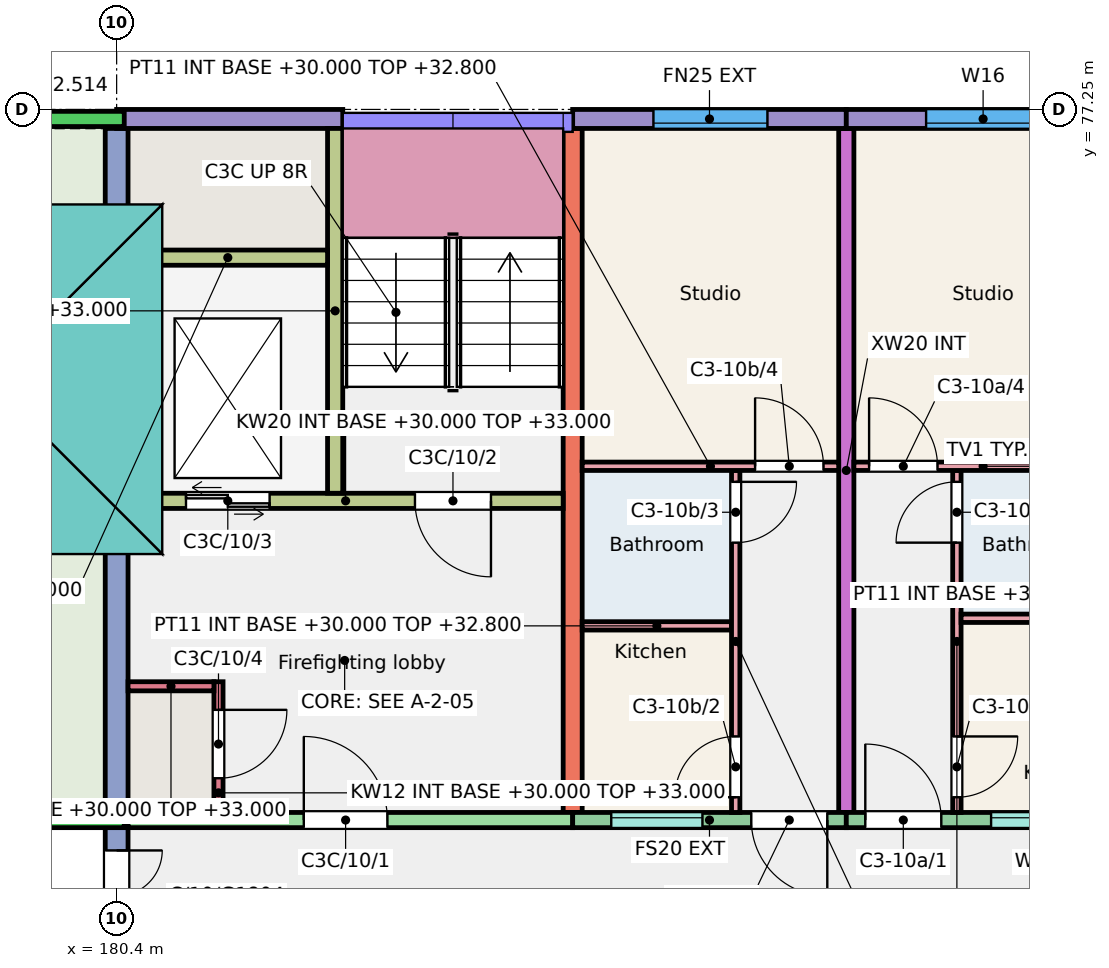
"""IFC4 building model, lengths in metres.
Left out: names, types, materials, properties, quantities, classifications, styles, units other than length and angle.
Written with IfcOpenShell. Run it as: python <this file> out.ifc"""

import sys

from ifc_helpers import new_model, si_unit, direction, frame, frame_2d, origin, place, context, subcontext, project, spatial, rectangle, extrude, element, fill, save


model = new_model("IFC4")
c1 = context("Model", 3, precision=1e-05, world=origin(), true_north=direction((0.0, 1.0)))
c2 = subcontext(c1, "Body", "Model", "MODEL_VIEW")
j1 = project(units=[si_unit("LENGTHUNIT", "METRE"), si_unit("PLANEANGLEUNIT", "RADIAN")], contexts=[c1])
p1 = place(None, origin())
s1 = spatial("IfcSite", under=j1, at=p1, CompositionType="ELEMENT")
p2 = place(p1, origin())
s2 = spatial("IfcBuilding", under=s1, at=p2, CompositionType="ELEMENT")
p3 = place(p2, frame((0.0, 0.0, 30.0)))
s3 = spatial("IfcBuildingStorey", under=s2, at=p3, CompositionType="ELEMENT", Elevation=30.0)
p4 = place(p3, frame((180.4, 66.0, 0.0), z_axis=(0.0, 0.0, 1.0), x_axis=(0.0, 1.0, 0.0)))
e1 = element("IfcWall", 1, at=p4, inside=s3, PredefinedType="SHEAR", context=c2, shape_type="SweptSolid", body=[
    extrude(rectangle(XDim=11.0, YDim=0.3, at=frame_2d((5.5, 0.0))), origin(), (0.0, 0.0, 1.0), 3.0),
])
p5 = place(p4, frame((0.3, 0.0, 0.0)))
e2 = element("IfcOpeningElement", 2, at=p5, cuts=e1, PredefinedType="OPENING", context=c2, shape_type="SweptSolid", body=[
    extrude(rectangle(XDim=1.2, YDim=2.1, at=frame_2d((0.6, 1.05))), frame((0.0, 0.16, 0.0), z_axis=(0.0, -1.0, 0.0), x_axis=(1.0, 0.0, 0.0)), (0.0, 0.0, 1.0), 0.32),
])
p6 = place(p3, frame((186.4, 68.0, 0.0), z_axis=(0.0, 0.0, 1.0), x_axis=(0.0, 1.0, 0.0)))
e3 = element("IfcWall", 3, at=p6, inside=s3, PredefinedType="SHEAR", context=c2, shape_type="SweptSolid", body=[
    extrude(rectangle(XDim=9.0, YDim=0.25, at=frame_2d((4.5, 0.0))), origin(), (0.0, 0.0, 1.0), 3.0),
])
p7 = place(p3, frame((190.0, 68.0, 0.0), z_axis=(0.0, 0.0, 1.0), x_axis=(0.0, 1.0, 0.0)))
e4 = element("IfcWall", 4, at=p7, inside=s3, PredefinedType="SHEAR", context=c2, shape_type="SweptSolid", body=[
    extrude(rectangle(XDim=9.0, YDim=0.2, at=frame_2d((4.5, 0.0))), origin(), (0.0, 0.0, 1.0), 3.0),
])
p8 = place(p3, frame((180.4, 77.125, 0.0), z_axis=(0.0, 0.0, 1.0), x_axis=(1.0, 0.0, 0.0)))
e5 = element("IfcWall", 5, at=p8, inside=s3, PredefinedType="SOLIDWALL", context=c2, shape_type="SweptSolid", body=[
    extrude(rectangle(XDim=2.975, YDim=0.25, at=frame_2d((1.488, 0.0))), origin(), (0.0, 0.0, 1.0), 3.0),
])
p9 = place(p3, frame((180.55, 67.9, 0.0), z_axis=(0.0, 0.0, 1.0), x_axis=(1.0, 0.0, 0.0)))
e6 = element("IfcWall", 6, at=p9, inside=s3, PredefinedType="SHEAR", context=c2, shape_type="SweptSolid", body=[
    extrude(rectangle(XDim=5.85, YDim=0.2, at=frame_2d((2.925, 0.0))), origin(), (0.0, 0.0, 1.0), 3.0),
])
p10 = place(p9, frame((2.312, 0.0, 0.0)))
e7 = element("IfcOpeningElement", 7, at=p10, cuts=e6, PredefinedType="OPENING", context=c2, shape_type="SweptSolid", body=[
    extrude(rectangle(XDim=1.1, YDim=2.1, at=frame_2d((0.55, 1.05))), frame((0.0, 0.11, 0.0), z_axis=(0.0, -1.0, 0.0), x_axis=(1.0, 0.0, 0.0)), (0.0, 0.0, 1.0), 0.22),
])
p11 = place(p3, frame((180.55, 72.1, 0.0), z_axis=(0.0, 0.0, 1.0), x_axis=(1.0, 0.0, 0.0)))
e8 = element("IfcWall", 8, at=p11, inside=s3, PredefinedType="SHEAR", context=c2, shape_type="SweptSolid", body=[
    extrude(rectangle(XDim=5.725, YDim=0.2, at=frame_2d((2.862, 0.0))), origin(), (0.0, 0.0, 1.0), 3.0),
])
p12 = place(p11, frame((3.775, 0.0, 0.0)))
e9 = element("IfcOpeningElement", 9, at=p12, cuts=e8, PredefinedType="OPENING", context=c2, shape_type="SweptSolid", body=[
    extrude(rectangle(XDim=1.0, YDim=2.1, at=frame_2d((0.5, 1.05))), frame((0.0, 0.11, 0.0), z_axis=(0.0, -1.0, 0.0), x_axis=(1.0, 0.0, 0.0)), (0.0, 0.0, 1.0), 0.22),
])
p13 = place(p11, frame((0.762, 0.0, 0.0)))
e10 = element("IfcOpeningElement", 10, at=p13, cuts=e8, PredefinedType="OPENING", context=c2, shape_type="SweptSolid", body=[
    extrude(rectangle(XDim=1.1, YDim=2.1, at=frame_2d((0.55, 1.05))), frame((0.0, 0.11, 0.0), z_axis=(0.0, -1.0, 0.0), x_axis=(1.0, 0.0, 0.0)), (0.0, 0.0, 1.0), 0.22),
])
p14 = place(p3, frame((183.275, 72.2, 0.0), z_axis=(0.0, 0.0, 1.0), x_axis=(0.0, 1.0, 0.0)))
e11 = element("IfcWall", 11, at=p14, inside=s3, PredefinedType="SHEAR", context=c2, shape_type="SweptSolid", body=[
    extrude(rectangle(XDim=4.8, YDim=0.2, at=frame_2d((2.4, 0.0))), origin(), (0.0, 0.0, 1.0), 3.0),
])
p15 = place(p3, frame((180.55, 75.3, 0.0), z_axis=(0.0, 0.0, 1.0), x_axis=(1.0, 0.0, 0.0)))
e12 = element("IfcWall", 12, at=p15, inside=s3, PredefinedType="SHEAR", context=c2, shape_type="SweptSolid", body=[
    extrude(rectangle(XDim=2.625, YDim=0.2, at=frame_2d((1.312, 0.0))), origin(), (0.0, 0.0, 1.0), 3.0),
])
p16 = place(p3, frame((181.74, 68.0, 0.0), z_axis=(0.0, 0.0, 1.0), x_axis=(0.0, 1.0, 0.0)))
e13 = element("IfcWall", 13, at=p16, inside=s3, PredefinedType="SHEAR", context=c2, shape_type="SweptSolid", body=[
    extrude(rectangle(XDim=1.72, YDim=0.12, at=frame_2d((0.86, 0.0))), origin(), (0.0, 0.0, 1.0), 3.0),
])
p17 = place(p16, frame((0.45, 0.0, 0.0)))
e14 = element("IfcOpeningElement", 14, at=p17, cuts=e13, PredefinedType="OPENING", context=c2, shape_type="SweptSolid", body=[
    extrude(rectangle(XDim=0.9, YDim=2.1, at=frame_2d((0.45, 1.05))), frame((0.0, 0.07, 0.0), z_axis=(0.0, -1.0, 0.0), x_axis=(1.0, 0.0, 0.0)), (0.0, 0.0, 1.0), 0.14),
])
p18 = place(p3, frame((180.55, 69.66, 0.0), z_axis=(0.0, 0.0, 1.0), x_axis=(1.0, 0.0, 0.0)))
e15 = element("IfcWall", 15, at=p18, inside=s3, PredefinedType="SHEAR", context=c2, shape_type="SweptSolid", body=[
    extrude(rectangle(XDim=1.13, YDim=0.12, at=frame_2d((0.565, 0.0))), origin(), (0.0, 0.0, 1.0), 3.0),
])
p19 = place(p3, frame((186.4, 77.125, 0.0), z_axis=(0.0, 0.0, 1.0), x_axis=(1.0, 0.0, 0.0)))
e16 = element("IfcWall", 16, at=p19, inside=s3, PredefinedType="SOLIDWALL", context=c2, shape_type="SweptSolid", body=[
    extrude(rectangle(XDim=3.6, YDim=0.25, at=frame_2d((1.8, 0.0))), origin(), (0.0, 0.0, 1.0), 3.0),
])
p20 = place(p19, frame((1.062, 0.0, 0.9)))
e17 = element("IfcOpeningElement", 17, at=p20, cuts=e16, PredefinedType="OPENING", context=c2, shape_type="SweptSolid", body=[
    extrude(rectangle(XDim=1.5, YDim=1.5, at=frame_2d((0.75, 0.75))), frame((0.0, 0.135, 0.0), z_axis=(0.0, -1.0, 0.0), x_axis=(1.0, 0.0, 0.0)), (0.0, 0.0, 1.0), 0.27),
])
p21 = place(p3, frame((186.4, 67.9, 0.0), z_axis=(0.0, 0.0, 1.0), x_axis=(1.0, 0.0, 0.0)))
e18 = element("IfcWall", 18, at=p21, inside=s3, PredefinedType="SOLIDWALL", context=c2, shape_type="SweptSolid", body=[
    extrude(rectangle(XDim=3.6, YDim=0.2, at=frame_2d((1.8, 0.0))), origin(), (0.0, 0.0, 1.0), 3.0),
])
p22 = place(p21, frame((0.508, 0.0, 1.1)))
e19 = element("IfcOpeningElement", 19, at=p22, cuts=e18, PredefinedType="OPENING", context=c2, shape_type="SweptSolid", body=[
    extrude(rectangle(XDim=1.2, YDim=1.3, at=frame_2d((0.6, 0.65))), frame((0.0, 0.11, 0.0), z_axis=(0.0, -1.0, 0.0), x_axis=(1.0, 0.0, 0.0)), (0.0, 0.0, 1.0), 0.22),
])
p23 = place(p21, frame((2.35, 0.0, 0.0)))
e20 = element("IfcOpeningElement", 20, at=p23, cuts=e18, PredefinedType="OPENING", context=c2, shape_type="SweptSolid", body=[
    extrude(rectangle(XDim=1.0, YDim=2.1, at=frame_2d((0.5, 1.05))), frame((0.0, 0.11, 0.0), z_axis=(0.0, -1.0, 0.0), x_axis=(1.0, 0.0, 0.0)), (0.0, 0.0, 1.0), 0.22),
])
p24 = place(p3, frame((190.0, 77.125, 0.0), z_axis=(0.0, 0.0, 1.0), x_axis=(1.0, 0.0, 0.0)))
e21 = element("IfcWall", 21, at=p24, inside=s3, PredefinedType="SOLIDWALL", context=c2, shape_type="SweptSolid", body=[
    extrude(rectangle(XDim=3.6, YDim=0.25, at=frame_2d((1.8, 0.0))), origin(), (0.0, 0.0, 1.0), 3.0),
])
p25 = place(p24, frame((1.05, 0.0, 0.9)))
e22 = element("IfcOpeningElement", 22, at=p25, cuts=e21, PredefinedType="OPENING", context=c2, shape_type="SweptSolid", body=[
    extrude(rectangle(XDim=1.5, YDim=1.5, at=frame_2d((0.75, 0.75))), frame((0.0, 0.135, 0.0), z_axis=(0.0, -1.0, 0.0), x_axis=(1.0, 0.0, 0.0)), (0.0, 0.0, 1.0), 0.27),
])
p26 = place(p3, frame((190.0, 67.9, 0.0), z_axis=(0.0, 0.0, 1.0), x_axis=(1.0, 0.0, 0.0)))
e23 = element("IfcWall", 23, at=p26, inside=s3, PredefinedType="SOLIDWALL", context=c2, shape_type="SweptSolid", body=[
    extrude(rectangle(XDim=3.6, YDim=0.2, at=frame_2d((1.8, 0.0))), origin(), (0.0, 0.0, 1.0), 3.0),
])
p27 = place(p26, frame((1.905, 0.0, 1.1)))
e24 = element("IfcOpeningElement", 24, at=p27, cuts=e23, PredefinedType="OPENING", context=c2, shape_type="SweptSolid", body=[
    extrude(rectangle(XDim=1.2, YDim=1.3, at=frame_2d((0.6, 0.65))), frame((0.0, 0.11, 0.0), z_axis=(0.0, -1.0, 0.0), x_axis=(1.0, 0.0, 0.0)), (0.0, 0.0, 1.0), 0.22),
])
p28 = place(p26, frame((0.25, 0.0, 0.0)))
e25 = element("IfcOpeningElement", 25, at=p28, cuts=e23, PredefinedType="OPENING", context=c2, shape_type="SweptSolid", body=[
    extrude(rectangle(XDim=1.0, YDim=2.1, at=frame_2d((0.5, 1.05))), frame((0.0, 0.11, 0.0), z_axis=(0.0, -1.0, 0.0), x_axis=(1.0, 0.0, 0.0)), (0.0, 0.0, 1.0), 0.22),
])
for number, where, z_axis, x_axis in (
    (26, (177.425, 72.1, 0.0), (0.0, 0.0, 1.0), (1.0, 0.0, 0.0)),
    (27, (177.425, 75.3, 0.0), (0.0, 0.0, 1.0), (1.0, 0.0, 0.0)),
):
    element("IfcWall", number, at=place(p3, frame(where, z_axis=z_axis, x_axis=x_axis)), inside=s3, PredefinedType="SHEAR", context=c2, shape_type="SweptSolid", body=[
        extrude(rectangle(XDim=2.825, YDim=0.2, at=frame_2d((1.413, 0.0))), origin(), (0.0, 0.0, 1.0), 1.5),
    ])
for number, where, z_axis, x_axis in (
    (28, (174.3, 77.125, 0.0), (0.0, 0.0, 1.0), (1.0, 0.0, 0.0)),
    (29, (174.3, 67.9, 0.0), (0.0, 0.0, 1.0), (1.0, 0.0, 0.0)),
):
    element("IfcWall", number, at=place(p3, frame(where, z_axis=z_axis, x_axis=x_axis)), inside=s3, PredefinedType="PARAPET", context=c2, shape_type="SweptSolid", body=[
        extrude(rectangle(XDim=6.2, YDim=0.2, at=frame_2d((3.1, 0.0))), origin(), (0.0, 0.0, 1.0), 1.1),
    ])
p29 = place(p3, frame((191.455, 68.0, 0.0), z_axis=(0.0, 0.0, 1.0), x_axis=(0.0, 1.0, 0.0)))
e30 = element("IfcWall", 30, at=p29, inside=s3, PredefinedType="PARTITIONING", context=c2, shape_type="SweptSolid", body=[
    extrude(rectangle(XDim=4.5, YDim=0.11, at=frame_2d((2.25, 0.0))), origin(), (0.0, 0.0, 1.0), 2.75),
])
p30 = place(p29, frame((0.2, 0.0, 0.0)))
e31 = element("IfcOpeningElement", 31, at=p30, cuts=e30, PredefinedType="OPENING", context=c2, shape_type="SweptSolid", body=[
    extrude(rectangle(XDim=0.8, YDim=2.1, at=frame_2d((0.4, 1.05))), frame((0.0, 0.065, 0.0), z_axis=(0.0, -1.0, 0.0), x_axis=(1.0, 0.0, 0.0)), (0.0, 0.0, 1.0), 0.13),
])
p31 = place(p29, frame((3.55, 0.0, 0.0)))
e32 = element("IfcOpeningElement", 32, at=p31, cuts=e30, PredefinedType="OPENING", context=c2, shape_type="SweptSolid", body=[
    extrude(rectangle(XDim=0.8, YDim=2.1, at=frame_2d((0.4, 1.05))), frame((0.0, 0.065, 0.0), z_axis=(0.0, -1.0, 0.0), x_axis=(1.0, 0.0, 0.0)), (0.0, 0.0, 1.0), 0.13),
])
p32 = place(p3, frame((191.51, 70.555, 0.0), z_axis=(0.0, 0.0, 1.0), x_axis=(1.0, 0.0, 0.0)))
e33 = element("IfcWall", 33, at=p32, inside=s3, PredefinedType="PARTITIONING", context=c2, shape_type="SweptSolid", body=[
    extrude(rectangle(XDim=1.99, YDim=0.11, at=frame_2d((0.995, 0.0))), origin(), (0.0, 0.0, 1.0), 2.75),
])
p33 = place(p3, frame((190.1, 72.555, 0.0), z_axis=(0.0, 0.0, 1.0), x_axis=(1.0, 0.0, 0.0)))
e34 = element("IfcWall", 34, at=p33, inside=s3, PredefinedType="PARTITIONING", context=c2, shape_type="SweptSolid", body=[
    extrude(rectangle(XDim=3.4, YDim=0.11, at=frame_2d((1.7, 0.0))), origin(), (0.0, 0.0, 1.0), 2.75),
])
p34 = place(p33, frame((0.2, 0.0, 0.0)))
e35 = element("IfcOpeningElement", 35, at=p34, cuts=e34, PredefinedType="OPENING", context=c2, shape_type="SweptSolid", body=[
    extrude(rectangle(XDim=0.9, YDim=2.1, at=frame_2d((0.45, 1.05))), frame((0.0, 0.065, 0.0), z_axis=(0.0, -1.0, 0.0), x_axis=(1.0, 0.0, 0.0)), (0.0, 0.0, 1.0), 0.13),
])
p35 = place(p3, frame((186.525, 70.455, 0.0), z_axis=(0.0, 0.0, 1.0), x_axis=(1.0, 0.0, 0.0)))
e36 = element("IfcWall", 36, at=p35, inside=s3, PredefinedType="PARTITIONING", context=c2, shape_type="SweptSolid", body=[
    extrude(rectangle(XDim=1.965, YDim=0.11, at=frame_2d((0.982, 0.0))), origin(), (0.0, 0.0, 1.0), 2.8),
])
p36 = place(p3, frame((188.545, 68.0, 0.0), z_axis=(0.0, 0.0, 1.0), x_axis=(0.0, 1.0, 0.0)))
e37 = element("IfcWall", 37, at=p36, inside=s3, PredefinedType="PARTITIONING", context=c2, shape_type="SweptSolid", body=[
    extrude(rectangle(XDim=4.5, YDim=0.11, at=frame_2d((2.25, 0.0))), origin(), (0.0, 0.0, 1.0), 2.8),
])
p37 = place(p36, frame((0.2, 0.0, 0.0)))
e38 = element("IfcOpeningElement", 38, at=p37, cuts=e37, PredefinedType="OPENING", context=c2, shape_type="SweptSolid", body=[
    extrude(rectangle(XDim=0.8, YDim=2.1, at=frame_2d((0.4, 1.05))), frame((0.0, 0.065, 0.0), z_axis=(0.0, -1.0, 0.0), x_axis=(1.0, 0.0, 0.0)), (0.0, 0.0, 1.0), 0.13),
])
p38 = place(p36, frame((3.55, 0.0, 0.0)))
e39 = element("IfcOpeningElement", 39, at=p38, cuts=e37, PredefinedType="OPENING", context=c2, shape_type="SweptSolid", body=[
    extrude(rectangle(XDim=0.8, YDim=2.1, at=frame_2d((0.4, 1.05))), frame((0.0, 0.065, 0.0), z_axis=(0.0, -1.0, 0.0), x_axis=(1.0, 0.0, 0.0)), (0.0, 0.0, 1.0), 0.13),
])
p39 = place(p3, frame((186.525, 72.555, 0.0), z_axis=(0.0, 0.0, 1.0), x_axis=(1.0, 0.0, 0.0)))
e40 = element("IfcWall", 40, at=p39, inside=s3, PredefinedType="PARTITIONING", context=c2, shape_type="SweptSolid", body=[
    extrude(rectangle(XDim=3.375, YDim=0.11, at=frame_2d((1.688, 0.0))), origin(), (0.0, 0.0, 1.0), 2.8),
])
p40 = place(p39, frame((2.275, 0.0, 0.0)))
e41 = element("IfcOpeningElement", 41, at=p40, cuts=e40, PredefinedType="OPENING", context=c2, shape_type="SweptSolid", body=[
    extrude(rectangle(XDim=0.9, YDim=2.1, at=frame_2d((0.45, 1.05))), frame((0.0, 0.065, 0.0), z_axis=(0.0, -1.0, 0.0), x_axis=(1.0, 0.0, 0.0)), (0.0, 0.0, 1.0), 0.13),
])
p41 = place(p27, origin())
e42 = element("IfcWindow", 42, at=p41, inside=s3, PartitioningType="SINGLE_PANEL", PredefinedType="WINDOW", context=c2, shape_type="SweptSolid", body=[
    extrude(rectangle(XDim=1.2, YDim=1.3, at=frame_2d((0.6, 0.65))), frame((0.0, 0.06, 0.0), z_axis=(0.0, -1.0, 0.0), x_axis=(1.0, 0.0, 0.0)), (0.0, 0.0, 1.0), 0.06),
])
fill(e24, e42)
p42 = place(p25, origin())
e43 = element("IfcWindow", 43, at=p42, inside=s3, PartitioningType="SINGLE_PANEL", PredefinedType="WINDOW", context=c2, shape_type="SweptSolid", body=[
    extrude(rectangle(XDim=1.5, YDim=1.5, at=frame_2d((0.75, 0.75))), frame((0.0, -0.025, 0.0), z_axis=(0.0, -1.0, 0.0), x_axis=(1.0, 0.0, 0.0)), (0.0, 0.0, 1.0), 0.06),
])
fill(e22, e43)
p43 = place(p22, origin())
e44 = element("IfcWindow", 44, at=p43, inside=s3, PartitioningType="SINGLE_PANEL", PredefinedType="WINDOW", context=c2, shape_type="SweptSolid", body=[
    extrude(rectangle(XDim=1.2, YDim=1.3, at=frame_2d((0.6, 0.65))), frame((0.0, 0.06, 0.0), z_axis=(0.0, -1.0, 0.0), x_axis=(1.0, 0.0, 0.0)), (0.0, 0.0, 1.0), 0.06),
])
fill(e19, e44)
p44 = place(p20, origin())
e45 = element("IfcWindow", 45, at=p44, inside=s3, PartitioningType="SINGLE_PANEL", PredefinedType="WINDOW", context=c2, shape_type="SweptSolid", body=[
    extrude(rectangle(XDim=1.5, YDim=1.5, at=frame_2d((0.75, 0.75))), frame((0.0, -0.025, 0.0), z_axis=(0.0, -1.0, 0.0), x_axis=(1.0, 0.0, 0.0)), (0.0, 0.0, 1.0), 0.06),
])
fill(e17, e45)
p45 = place(p28, origin())
e46 = element("IfcDoor", 46, at=p45, inside=s3, OperationType="SINGLE_SWING_LEFT", PredefinedType="DOOR", context=c2, shape_type="SweptSolid", body=[
    extrude(rectangle(XDim=1.0, YDim=2.1, at=frame_2d((0.5, 1.05))), frame((0.0, 0.025, 0.0), z_axis=(0.0, -1.0, 0.0), x_axis=(1.0, 0.0, 0.0)), (0.0, 0.0, 1.0), 0.05),
])
fill(e25, e46)
p46 = place(p30, origin())
e47 = element("IfcDoor", 47, at=p46, inside=s3, OperationType="SINGLE_SWING_RIGHT", PredefinedType="DOOR", context=c2, shape_type="SweptSolid", body=[
    extrude(rectangle(XDim=0.8, YDim=2.1, at=frame_2d((0.4, 1.05))), frame((0.0, 0.025, 0.0), z_axis=(0.0, -1.0, 0.0), x_axis=(1.0, 0.0, 0.0)), (0.0, 0.0, 1.0), 0.05),
])
fill(e31, e47)
p47 = place(p31, origin())
e48 = element("IfcDoor", 48, at=p47, inside=s3, OperationType="SINGLE_SWING_LEFT", PredefinedType="DOOR", context=c2, shape_type="SweptSolid", body=[
    extrude(rectangle(XDim=0.8, YDim=2.1, at=frame_2d((0.4, 1.05))), frame((0.0, 0.025, 0.0), z_axis=(0.0, -1.0, 0.0), x_axis=(1.0, 0.0, 0.0)), (0.0, 0.0, 1.0), 0.05),
])
fill(e32, e48)
p48 = place(p34, origin())
e49 = element("IfcDoor", 49, at=p48, inside=s3, OperationType="SINGLE_SWING_LEFT", PredefinedType="DOOR", context=c2, shape_type="SweptSolid", body=[
    extrude(rectangle(XDim=0.9, YDim=2.1, at=frame_2d((0.45, 1.05))), frame((0.0, 0.025, 0.0), z_axis=(0.0, -1.0, 0.0), x_axis=(1.0, 0.0, 0.0)), (0.0, 0.0, 1.0), 0.05),
])
fill(e35, e49)
p49 = place(p23, origin())
e50 = element("IfcDoor", 50, at=p49, inside=s3, OperationType="SINGLE_SWING_RIGHT", PredefinedType="DOOR", context=c2, shape_type="SweptSolid", body=[
    extrude(rectangle(XDim=1.0, YDim=2.1, at=frame_2d((0.5, 1.05))), frame((0.0, 0.025, 0.0), z_axis=(0.0, -1.0, 0.0), x_axis=(1.0, 0.0, 0.0)), (0.0, 0.0, 1.0), 0.05),
])
fill(e20, e50)
p50 = place(p37, origin())
e51 = element("IfcDoor", 51, at=p50, inside=s3, OperationType="SINGLE_SWING_LEFT", PredefinedType="DOOR", context=c2, shape_type="SweptSolid", body=[
    extrude(rectangle(XDim=0.8, YDim=2.1, at=frame_2d((0.4, 1.05))), frame((0.0, 0.025, 0.0), z_axis=(0.0, -1.0, 0.0), x_axis=(1.0, 0.0, 0.0)), (0.0, 0.0, 1.0), 0.05),
])
fill(e38, e51)
p51 = place(p38, origin())
e52 = element("IfcDoor", 52, at=p51, inside=s3, OperationType="SINGLE_SWING_RIGHT", PredefinedType="DOOR", context=c2, shape_type="SweptSolid", body=[
    extrude(rectangle(XDim=0.8, YDim=2.1, at=frame_2d((0.4, 1.05))), frame((0.0, 0.025, 0.0), z_axis=(0.0, -1.0, 0.0), x_axis=(1.0, 0.0, 0.0)), (0.0, 0.0, 1.0), 0.05),
])
fill(e39, e52)
p52 = place(p40, origin())
e53 = element("IfcDoor", 53, at=p52, inside=s3, OperationType="SINGLE_SWING_LEFT", PredefinedType="DOOR", context=c2, shape_type="SweptSolid", body=[
    extrude(rectangle(XDim=0.9, YDim=2.1, at=frame_2d((0.45, 1.05))), frame((0.0, 0.025, 0.0), z_axis=(0.0, -1.0, 0.0), x_axis=(1.0, 0.0, 0.0)), (0.0, 0.0, 1.0), 0.05),
])
fill(e41, e53)
p53 = place(p10, origin())
e54 = element("IfcDoor", 54, at=p53, inside=s3, OperationType="SINGLE_SWING_LEFT", PredefinedType="DOOR", context=c2, shape_type="SweptSolid", body=[
    extrude(rectangle(XDim=1.1, YDim=2.1, at=frame_2d((0.55, 1.05))), frame((0.0, 0.025, 0.0), z_axis=(0.0, -1.0, 0.0), x_axis=(1.0, 0.0, 0.0)), (0.0, 0.0, 1.0), 0.05),
])
fill(e7, e54)
p54 = place(p12, origin())
e55 = element("IfcDoor", 55, at=p54, inside=s3, OperationType="SINGLE_SWING_RIGHT", PredefinedType="DOOR", context=c2, shape_type="SweptSolid", body=[
    extrude(rectangle(XDim=1.0, YDim=2.1, at=frame_2d((0.5, 1.05))), frame((0.0, 0.025, 0.0), z_axis=(0.0, -1.0, 0.0), x_axis=(1.0, 0.0, 0.0)), (0.0, 0.0, 1.0), 0.05),
])
fill(e9, e55)
p55 = place(p13, origin())
e56 = element("IfcDoor", 56, at=p55, inside=s3, OperationType="DOUBLE_DOOR_SLIDING", PredefinedType="DOOR", context=c2, shape_type="SweptSolid", body=[
    extrude(rectangle(XDim=1.1, YDim=2.1, at=frame_2d((0.55, 1.05))), frame((0.0, 0.025, 0.0), z_axis=(0.0, -1.0, 0.0), x_axis=(1.0, 0.0, 0.0)), (0.0, 0.0, 1.0), 0.05),
])
fill(e10, e56)
p56 = place(p17, origin())
e57 = element("IfcDoor", 57, at=p56, inside=s3, OperationType="SINGLE_SWING_RIGHT", PredefinedType="DOOR", context=c2, shape_type="SweptSolid", body=[
    extrude(rectangle(XDim=0.9, YDim=2.1, at=frame_2d((0.45, 1.05))), frame((0.0, 0.025, 0.0), z_axis=(0.0, -1.0, 0.0), x_axis=(1.0, 0.0, 0.0)), (0.0, 0.0, 1.0), 0.05),
])
fill(e14, e57)
p57 = place(p5, origin())
e58 = element("IfcDoor", 58, at=p57, inside=s3, OperationType="DOUBLE_DOOR_SINGLE_SWING", PredefinedType="DOOR", context=c2, shape_type="SweptSolid", body=[
    extrude(rectangle(XDim=1.2, YDim=2.1, at=frame_2d((0.6, 1.05))), frame((0.0, 0.025, 0.0), z_axis=(0.0, -1.0, 0.0), x_axis=(1.0, 0.0, 0.0)), (0.0, 0.0, 1.0), 0.05),
])
fill(e2, e58)
save(model, sys.argv[1])
